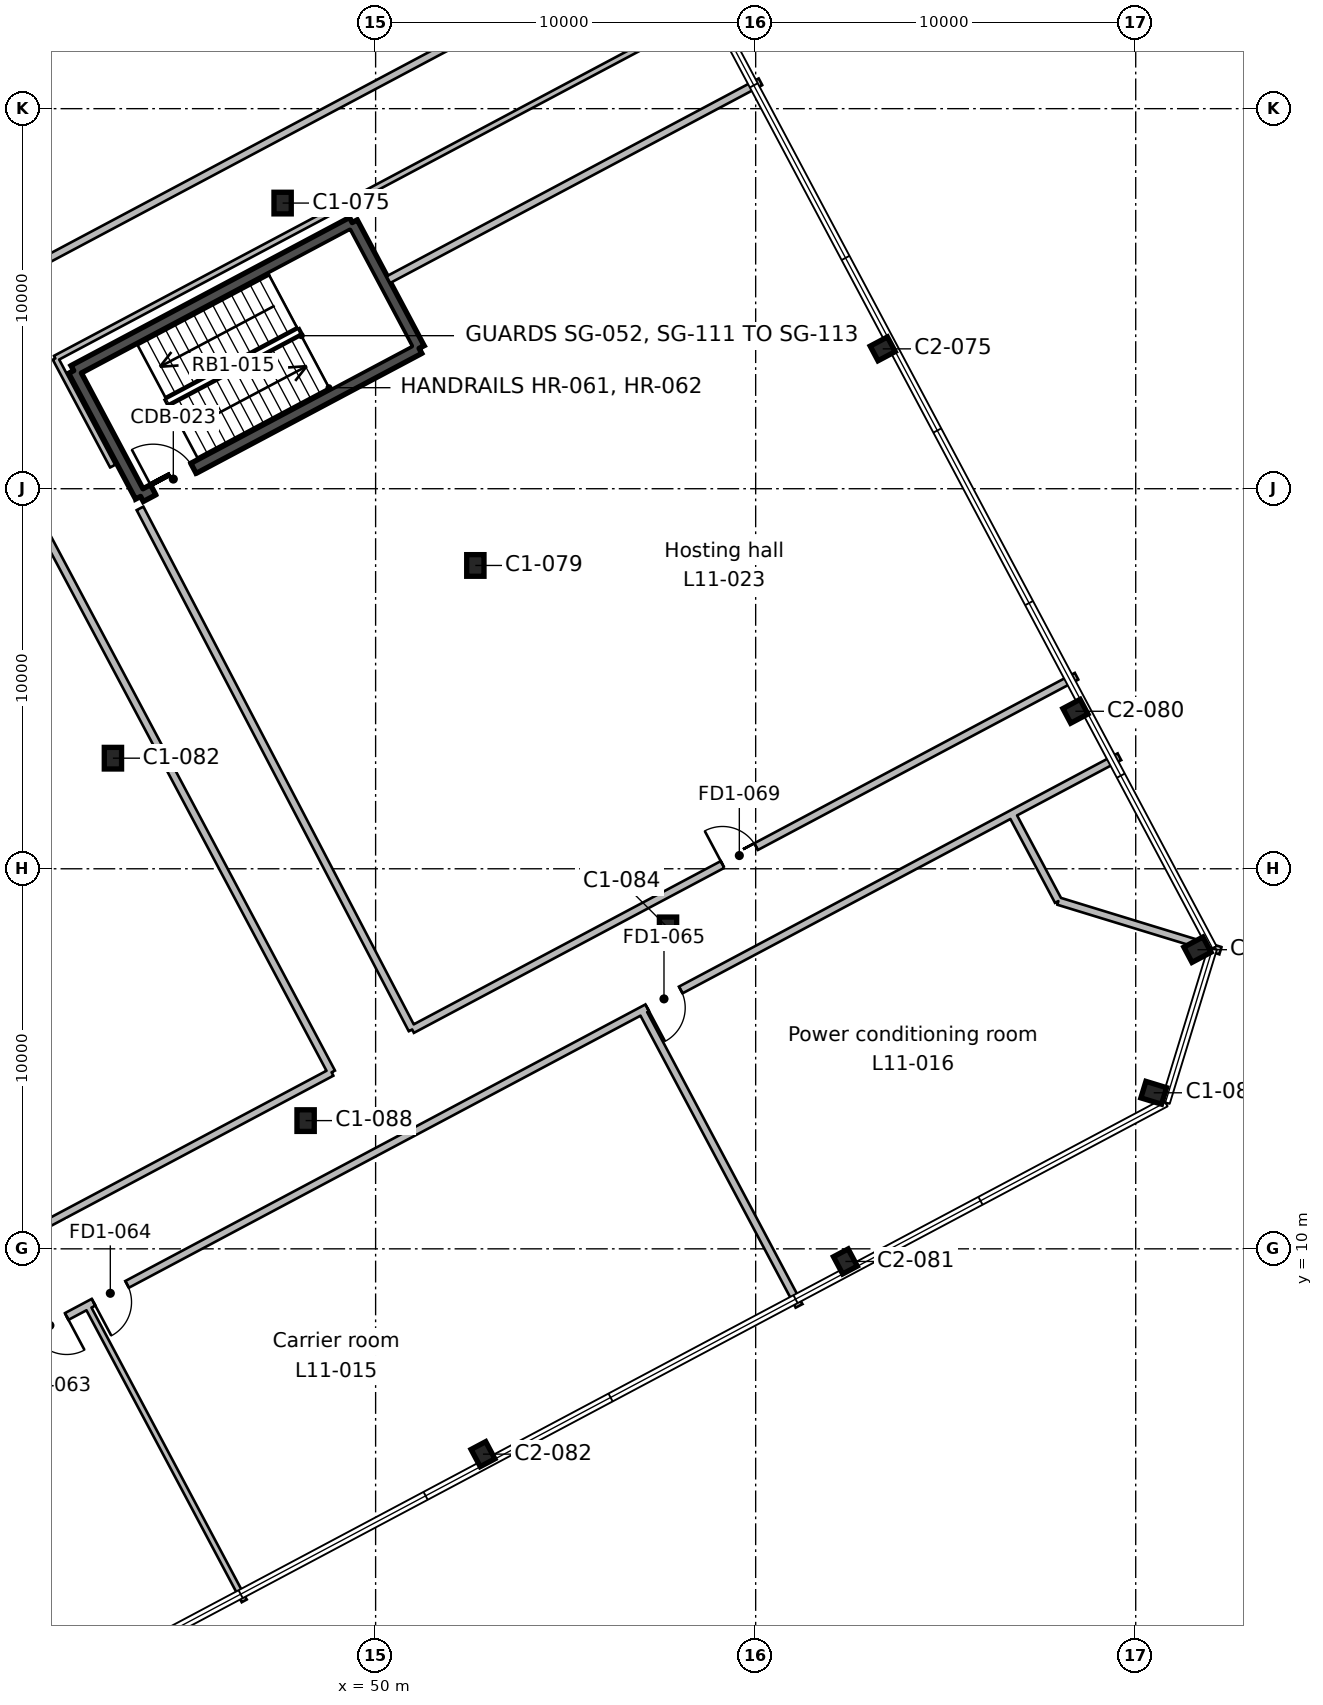
"""IFC4 building model, lengths in metres.
Left out: names, types, materials, properties, quantities, classifications, styles, units other than length and angle.
Written with IfcOpenShell. Run it as: python <this file> out.ifc"""

import sys

from ifc_helpers import new_model, si_unit, direction, frame, frame_2d, origin, origin_2d, place, context, subcontext, project, spatial, rectangle, i_section, extrude, element, fill, save


model = new_model("IFC4")
c1 = context("Model", 3, precision=1e-05, world=origin(), true_north=direction((0.0, 1.0)))
c2 = subcontext(c1, "Body", "Model", "MODEL_VIEW")
j1 = project(units=[si_unit("LENGTHUNIT", "METRE"), si_unit("PLANEANGLEUNIT", "RADIAN")], contexts=[c1])
p1 = place(None, origin())
s1 = spatial("IfcSite", under=j1, at=p1, CompositionType="ELEMENT")
p2 = place(p1, origin())
s2 = spatial("IfcBuilding", under=s1, at=p2, CompositionType="ELEMENT")
p3 = place(p2, frame((0.0, 0.0, 60.8)))
s3 = spatial("IfcBuildingStorey", under=s2, at=p3, CompositionType="ELEMENT", Elevation=60.8)
for number, where, z_axis, x_axis in (
    (1, (52.825, 4.598, 0.0), (0.0, 0.0, 1.0), (0.883, 0.469, 0.0)),
    (2, (62.361, 9.668, 0.0), (0.0, 0.0, 1.0), (0.883, 0.469, 0.0)),
):
    element("IfcColumn", number, at=place(p3, frame(where, z_axis=z_axis, x_axis=x_axis)), inside=s3, PredefinedType="COLUMN", context=c2, shape_type="SweptSolid", body=[
        extrude(i_section(OverallWidth=0.437, OverallDepth=0.513, WebThickness=0.061, FlangeThickness=0.097, FilletRadius=0.015, at=origin_2d()), origin(), (0.0, 0.0, 1.0), 5.4),
    ])
for number, where, z_axis, x_axis in (
    (3, (48.158, 13.374, 0.0), (0.0, 0.0, 1.0), (1.0, 0.0, 0.0)),
    (4, (70.474, 14.106, 0.0), (0.0, 0.0, 1.0), (0.292, 0.956, 0.0)),
    (5, (71.625, 17.871, 0.0), (0.0, 0.0, 1.0), (-0.469, 0.883, 0.0)),
    (6, (57.694, 18.445, 0.0), (0.0, 0.0, 1.0), (1.0, 0.0, 0.0)),
    (7, (43.088, 22.91, 0.0), (0.0, 0.0, 1.0), (1.0, 0.0, 0.0)),
):
    element("IfcColumn", number, at=place(p3, frame(where, z_axis=z_axis, x_axis=x_axis)), inside=s3, PredefinedType="COLUMN", context=c2, shape_type="SweptSolid", body=[
        extrude(i_section(OverallWidth=0.455, OverallDepth=0.569, WebThickness=0.078, FlangeThickness=0.125, FilletRadius=0.015, at=origin_2d()), origin(), (0.0, 0.0, 1.0), 5.4),
    ])
p4 = place(p3, frame((68.413, 24.144, 0.0), z_axis=(0.0, 0.0, 1.0), x_axis=(-0.469471562786, 0.882947592859, 0.0)))
e8 = element("IfcColumn", 8, at=p4, inside=s3, PredefinedType="COLUMN", context=c2, shape_type="SweptSolid", body=[
    extrude(i_section(OverallWidth=0.437, OverallDepth=0.513, WebThickness=0.061, FlangeThickness=0.097, FilletRadius=0.015, at=origin_2d()), origin(), (0.0, 0.0, 1.0), 5.4),
])
p5 = place(p3, frame((52.624, 27.981, 0.0), z_axis=(0.0, 0.0, 1.0), x_axis=(1.0, 0.0, 0.0)))
e9 = element("IfcColumn", 9, at=p5, inside=s3, PredefinedType="COLUMN", context=c2, shape_type="SweptSolid", body=[
    extrude(i_section(OverallWidth=0.455, OverallDepth=0.569, WebThickness=0.078, FlangeThickness=0.125, FilletRadius=0.015, at=origin_2d()), origin(), (0.0, 0.0, 1.0), 5.4),
])
p6 = place(p3, frame((63.343, 33.68, 0.0), z_axis=(0.0, 0.0, 1.0), x_axis=(-0.469471562786, 0.882947592859, 0.0)))
e10 = element("IfcColumn", 10, at=p6, inside=s3, PredefinedType="COLUMN", context=c2, shape_type="SweptSolid", body=[
    extrude(i_section(OverallWidth=0.437, OverallDepth=0.513, WebThickness=0.061, FlangeThickness=0.097, FilletRadius=0.015, at=origin_2d()), origin(), (0.0, 0.0, 1.0), 5.4),
])
p7 = place(p3, frame((47.553, 37.516, 0.0), z_axis=(0.0, 0.0, 1.0), x_axis=(1.0, 0.0, 0.0)))
e11 = element("IfcColumn", 11, at=p7, inside=s3, PredefinedType="COLUMN", context=c2, shape_type="SweptSolid", body=[
    extrude(i_section(OverallWidth=0.455, OverallDepth=0.569, WebThickness=0.078, FlangeThickness=0.125, FilletRadius=0.015, at=origin_2d()), origin(), (0.0, 0.0, 1.0), 5.4),
])
p8 = place(p3, frame((49.384, 37.004, 0.0), z_axis=(0.0, 0.0, 1.0), x_axis=(0.46946936446, -0.882948761726, 0.0)))
e12 = element("IfcWall", 12, at=p8, inside=s3, PredefinedType="SHEAR", context=c2, shape_type="SweptSolid", body=[
    extrude(rectangle(XDim=3.75, YDim=0.3, at=frame_2d((1.875, 0.0))), origin(), (0.0, 0.0, 1.0), 5.4),
])
p9 = place(p3, frame((51.145, 33.693, 0.0), z_axis=(0.0, 0.0, 1.0), x_axis=(-0.882945809314, -0.469474917132, 0.0)))
e13 = element("IfcWall", 13, at=p9, inside=s3, PredefinedType="SHEAR", context=c2, shape_type="SweptSolid", body=[
    extrude(rectangle(XDim=8.3, YDim=0.3, at=frame_2d((4.15, 0.0))), origin(), (0.0, 0.0, 1.0), 5.4),
])
p10 = place(p9, frame((6.725, 0.0, 0.0)))
e14 = element("IfcOpeningElement", 14, at=p10, cuts=e13, PredefinedType="OPENING", context=c2, shape_type="SweptSolid", body=[
    extrude(rectangle(XDim=1.2, YDim=2.1, at=frame_2d((0.6, 1.05))), frame((0.0, 0.16, 0.0), z_axis=(0.0, -1.0, 0.0), x_axis=(1.0, 0.0, 0.0)), (0.0, 0.0, 1.0), 0.32),
])
p11 = place(p3, frame((43.816, 29.796, 0.0), z_axis=(0.0, 0.0, 1.0), x_axis=(-0.46946936446, 0.882948761726, 0.0)))
e15 = element("IfcWall", 15, at=p11, inside=s3, PredefinedType="SHEAR", context=c2, shape_type="SweptSolid", body=[
    extrude(rectangle(XDim=3.75, YDim=0.3, at=frame_2d((1.875, 0.0))), origin(), (0.0, 0.0, 1.0), 5.4),
])
p12 = place(p3, frame((42.055, 33.107, 0.0), z_axis=(0.0, 0.0, 1.0), x_axis=(0.882945809314, 0.469474917132, 0.0)))
e16 = element("IfcWall", 16, at=p12, inside=s3, PredefinedType="SHEAR", context=c2, shape_type="SweptSolid", body=[
    extrude(rectangle(XDim=8.3, YDim=0.3, at=frame_2d((4.15, 0.0))), origin(), (0.0, 0.0, 1.0), 5.4),
])
p13 = place(p3, frame((0.0, 14.044, 0.0), z_axis=(0.0, 0.0, 1.0), x_axis=(0.882943219941, 0.469479786955, 0.0)))
e17 = element("IfcWall", 17, at=p13, inside=s3, PredefinedType="PARTITIONING", context=c2, shape_type="SweptSolid", body=[
    extrude(rectangle(XDim=65.607, YDim=0.2, at=frame_2d((32.803, 0.0))), origin(), (0.0, 0.0, 1.0), 5.0),
])
p14 = place(p13, frame((35.55, 0.0, 0.0)))
e18 = element("IfcOpeningElement", 18, at=p14, cuts=e17, PredefinedType="OPENING", context=c2, shape_type="SweptSolid", body=[
    extrude(rectangle(XDim=1.0, YDim=2.1, at=frame_2d((0.5, 1.05))), frame((0.0, 0.11, 0.0), z_axis=(0.0, -1.0, 0.0), x_axis=(1.0, 0.0, 0.0)), (0.0, 0.0, 1.0), 0.22),
])
p15 = place(p13, frame((32.15, 0.0, 0.0)))
e19 = element("IfcOpeningElement", 19, at=p15, cuts=e17, PredefinedType="OPENING", context=c2, shape_type="SweptSolid", body=[
    extrude(rectangle(XDim=1.0, YDim=2.1, at=frame_2d((0.5, 1.05))), frame((0.0, 0.11, 0.0), z_axis=(0.0, -1.0, 0.0), x_axis=(1.0, 0.0, 0.0)), (0.0, 0.0, 1.0), 0.22),
])
p16 = place(p13, frame((29.75, 0.0, 0.0)))
e20 = element("IfcOpeningElement", 20, at=p16, cuts=e17, PredefinedType="OPENING", context=c2, shape_type="SweptSolid", body=[
    extrude(rectangle(XDim=1.0, YDim=2.1, at=frame_2d((0.5, 1.05))), frame((0.0, 0.11, 0.0), z_axis=(0.0, -1.0, 0.0), x_axis=(1.0, 0.0, 0.0)), (0.0, 0.0, 1.0), 0.22),
])
p17 = place(p13, frame((13.95, 0.0, 0.0)))
e21 = element("IfcOpeningElement", 21, at=p17, cuts=e17, PredefinedType="OPENING", context=c2, shape_type="SweptSolid", body=[
    extrude(rectangle(XDim=1.0, YDim=2.1, at=frame_2d((0.5, 1.05))), frame((0.0, 0.11, 0.0), z_axis=(0.0, -1.0, 0.0), x_axis=(1.0, 0.0, 0.0)), (0.0, 0.0, 1.0), 0.22),
])
p18 = place(p3, frame((69.57, 22.948, 0.0), z_axis=(0.0, 0.0, 1.0), x_axis=(-0.882939582192, -0.469486628349, 0.0)))
e22 = element("IfcWall", 22, at=p18, inside=s3, PredefinedType="PARTITIONING", context=c2, shape_type="SweptSolid", body=[
    extrude(rectangle(XDim=63.39, YDim=0.2, at=frame_2d((31.695, 0.0))), origin(), (0.0, 0.0, 1.0), 5.0),
])
p19 = place(p18, frame((41.971, 0.0, 0.0)))
e23 = element("IfcOpeningElement", 23, at=p19, cuts=e22, PredefinedType="OPENING", context=c2, shape_type="SweptSolid", body=[
    extrude(rectangle(XDim=1.0, YDim=2.1, at=frame_2d((0.5, 1.05))), frame((0.0, 0.11, 0.0), z_axis=(0.0, -1.0, 0.0), x_axis=(1.0, 0.0, 0.0)), (0.0, 0.0, 1.0), 0.22),
])
p20 = place(p18, frame((31.371, 0.0, 0.0)))
e24 = element("IfcOpeningElement", 24, at=p20, cuts=e22, PredefinedType="OPENING", context=c2, shape_type="SweptSolid", body=[
    extrude(rectangle(XDim=1.0, YDim=2.1, at=frame_2d((0.5, 1.05))), frame((0.0, 0.11, 0.0), z_axis=(0.0, -1.0, 0.0), x_axis=(1.0, 0.0, 0.0)), (0.0, 0.0, 1.0), 0.22),
])
p21 = place(p18, frame((29.571, 0.0, 0.0)))
e25 = element("IfcOpeningElement", 25, at=p21, cuts=e22, PredefinedType="OPENING", context=c2, shape_type="SweptSolid", body=[
    extrude(rectangle(XDim=1.0, YDim=2.1, at=frame_2d((0.5, 1.05))), frame((0.0, 0.11, 0.0), z_axis=(0.0, -1.0, 0.0), x_axis=(1.0, 0.0, 0.0)), (0.0, 0.0, 1.0), 0.22),
])
p22 = place(p18, frame((13.071, 0.0, 0.0)))
e26 = element("IfcOpeningElement", 26, at=p22, cuts=e22, PredefinedType="OPENING", context=c2, shape_type="SweptSolid", body=[
    extrude(rectangle(XDim=1.0, YDim=2.1, at=frame_2d((0.5, 1.05))), frame((0.0, 0.11, 0.0), z_axis=(0.0, -1.0, 0.0), x_axis=(1.0, 0.0, 0.0)), (0.0, 0.0, 1.0), 0.22),
])
p23 = place(p3, frame((42.411, 8.506, 0.0), z_axis=(0.0, 0.0, 1.0), x_axis=(0.469578463112, -0.882890744646, 0.0)))
e27 = element("IfcWall", 27, at=p23, inside=s3, PredefinedType="PARTITIONING", context=c2, shape_type="SweptSolid", body=[
    extrude(rectangle(XDim=8.8, YDim=0.15, at=frame_2d((4.4, 0.0))), origin(), (0.0, 0.0, 1.0), 5.0),
])
p24 = place(p3, frame((38.546, 40.882, 0.0), z_axis=(0.0, 0.0, 1.0), x_axis=(0.88296536188, 0.469438142592, 0.0)))
e28 = element("IfcWall", 28, at=p24, inside=s3, PredefinedType="PARTITIONING", context=c2, shape_type="SweptSolid", body=[
    extrude(rectangle(XDim=10.515, YDim=0.2, at=frame_2d((5.257, 0.0))), origin(), (0.0, 0.0, 1.0), 5.0),
])
p25 = place(p3, frame((59.054, 42.725, 0.0), z_axis=(0.0, 0.0, 1.0), x_axis=(-0.882950585831, -0.469465933781, 0.0)))
e29 = element("IfcWall", 29, at=p25, inside=s3, PredefinedType="PARTITIONING", context=c2, shape_type="SweptSolid", body=[
    extrude(rectangle(XDim=19.8, YDim=0.15, at=frame_2d((9.9, 0.0))), origin(), (0.0, 0.0, 1.0), 5.0),
])
p26 = place(p3, frame((41.572, 33.43, 0.0), z_axis=(0.0, 0.0, 1.0), x_axis=(0.469510863882, -0.882926694974, 0.0)))
e30 = element("IfcWall", 30, at=p26, inside=s3, PredefinedType="PARTITIONING", context=c2, shape_type="SweptSolid", body=[
    extrude(rectangle(XDim=3.212, YDim=0.15, at=frame_2d((1.606, 0.0))), origin(), (0.0, 0.0, 1.0), 5.0),
])
p27 = place(p3, frame((43.801, 29.483, 0.0), z_axis=(0.0, 0.0, 1.0), x_axis=(0.462864260364, -0.886429171721, 0.0)))
e31 = element("IfcWall", 31, at=p27, inside=s3, PredefinedType="PARTITIONING", context=c2, shape_type="SweptSolid", body=[
    extrude(rectangle(XDim=15.469, YDim=0.2, at=frame_2d((7.734, 0.0))), origin(), (0.0, 0.0, 1.0), 5.0),
])
p28 = place(p3, frame((50.961, 15.771, 0.0), z_axis=(0.0, 0.0, 1.0), x_axis=(0.882969283776, 0.469430765831, 0.0)))
e32 = element("IfcWall", 32, at=p28, inside=s3, PredefinedType="PARTITIONING", context=c2, shape_type="SweptSolid", body=[
    extrude(rectangle(XDim=19.8, YDim=0.2, at=frame_2d((9.9, 0.0))), origin(), (0.0, 0.0, 1.0), 5.0),
])
p29 = place(p28, frame((9.25, 0.0, 0.0)))
e33 = element("IfcOpeningElement", 33, at=p29, cuts=e32, PredefinedType="OPENING", context=c2, shape_type="SweptSolid", body=[
    extrude(rectangle(XDim=1.0, YDim=2.1, at=frame_2d((0.5, 1.05))), frame((0.0, 0.11, 0.0), z_axis=(0.0, -1.0, 0.0), x_axis=(1.0, 0.0, 0.0)), (0.0, 0.0, 1.0), 0.22),
])
p30 = place(p3, frame((57.011, 16.269, 0.0), z_axis=(0.0, 0.0, 1.0), x_axis=(0.469445946219, -0.882961212952, 0.0)))
e34 = element("IfcWall", 34, at=p30, inside=s3, PredefinedType="PARTITIONING", context=c2, shape_type="SweptSolid", body=[
    extrude(rectangle(XDim=8.8, YDim=0.2, at=frame_2d((4.4, 0.0))), origin(), (0.0, 0.0, 1.0), 5.0),
])
p31 = place(p3, frame((50.336, 35.501, 0.0), z_axis=(0.0, 0.0, 1.0), x_axis=(0.88295860562, 0.469450850209, 0.0)))
e35 = element("IfcWall", 35, at=p31, inside=s3, PredefinedType="PARTITIONING", context=c2, shape_type="SweptSolid", body=[
    extrude(rectangle(XDim=11.089, YDim=0.2, at=frame_2d((5.544, 0.0))), origin(), (0.0, 0.0, 1.0), 5.0),
])
p32 = place(p3, frame((66.744, 21.445, 0.0), z_axis=(0.0, 0.0, 1.0), x_axis=(0.469720428517, -0.882815223608, 0.0)))
e36 = element("IfcWall", 36, at=p32, inside=s3, PredefinedType="PARTITIONING", context=c2, shape_type="SweptSolid", body=[
    extrude(rectangle(XDim=2.6, YDim=0.2, at=frame_2d((1.3, 0.0))), origin(), (0.0, 0.0, 1.0), 5.0),
])
p33 = place(p3, frame((67.965, 19.15, 0.0), z_axis=(0.0, 0.0, 1.0), x_axis=(0.956221844793, -0.292642757539, 0.0)))
e37 = element("IfcWall", 37, at=p33, inside=s3, PredefinedType="PARTITIONING", context=c2, shape_type="SweptSolid", body=[
    extrude(rectangle(XDim=4.459, YDim=0.2, at=frame_2d((2.229, 0.0))), origin(), (0.0, 0.0, 1.0), 5.0),
])
p34 = place(p3, frame((39.453, 32.303, 0.0), z_axis=(0.0, 0.0, 1.0), x_axis=(0.469461333319, -0.882953031887, 0.0)))
e38 = element("IfcWall", 38, at=p34, inside=s3, PredefinedType="PARTITIONING", context=c2, shape_type="SweptSolid", body=[
    extrude(rectangle(XDim=20.0, YDim=0.2, at=frame_2d((10.0, 0.0))), origin(), (0.0, 0.0, 1.0), 5.0),
])
p35 = place(p3, frame((48.842, 14.644, 0.0), z_axis=(0.0, 0.0, 1.0), x_axis=(-0.882924718888, -0.46951457994, 0.0)))
e39 = element("IfcWall", 39, at=p35, inside=s3, PredefinedType="PARTITIONING", context=c2, shape_type="SweptSolid", body=[
    extrude(rectangle(XDim=10.0, YDim=0.2, at=frame_2d((5.0, 0.0))), origin(), (0.0, 0.0, 1.0), 5.0),
])
p36 = place(p10, frame((1.2, 0.0, 0.0), z_axis=(0.0, 0.0, 1.0), x_axis=(-1.0, 0.0, 0.0)))
e40 = element("IfcDoor", 40, at=p36, inside=s3, OperationType="SINGLE_SWING_LEFT", PredefinedType="DOOR", context=c2, shape_type="SweptSolid", body=[
    extrude(rectangle(XDim=1.2, YDim=2.1, at=frame_2d((0.6, 1.05))), frame((0.0, 0.025, 0.0), z_axis=(0.0, -1.0, 0.0), x_axis=(1.0, 0.0, 0.0)), (0.0, 0.0, 1.0), 0.05),
])
fill(e14, e40)
p37 = place(p20, origin())
e41 = element("IfcDoor", 41, at=p37, inside=s3, OperationType="SINGLE_SWING_LEFT", PredefinedType="DOOR", context=c2, shape_type="SweptSolid", body=[
    extrude(rectangle(XDim=1.0, YDim=2.1, at=frame_2d((0.5, 1.05))), frame((0.0, 0.025, 0.0), z_axis=(0.0, -1.0, 0.0), x_axis=(1.0, 0.0, 0.0)), (0.0, 0.0, 1.0), 0.05),
])
fill(e24, e41)
p38 = place(p21, origin())
e42 = element("IfcDoor", 42, at=p38, inside=s3, OperationType="SINGLE_SWING_RIGHT", PredefinedType="DOOR", context=c2, shape_type="SweptSolid", body=[
    extrude(rectangle(XDim=1.0, YDim=2.1, at=frame_2d((0.5, 1.05))), frame((0.0, 0.025, 0.0), z_axis=(0.0, -1.0, 0.0), x_axis=(1.0, 0.0, 0.0)), (0.0, 0.0, 1.0), 0.05),
])
fill(e25, e42)
p39 = place(p22, origin())
e43 = element("IfcDoor", 43, at=p39, inside=s3, OperationType="SINGLE_SWING_RIGHT", PredefinedType="DOOR", context=c2, shape_type="SweptSolid", body=[
    extrude(rectangle(XDim=1.0, YDim=2.1, at=frame_2d((0.5, 1.05))), frame((0.0, 0.025, 0.0), z_axis=(0.0, -1.0, 0.0), x_axis=(1.0, 0.0, 0.0)), (0.0, 0.0, 1.0), 0.05),
])
fill(e26, e43)
p40 = place(p29, origin())
e44 = element("IfcDoor", 44, at=p40, inside=s3, OperationType="SINGLE_SWING_LEFT", PredefinedType="DOOR", context=c2, shape_type="SweptSolid", body=[
    extrude(rectangle(XDim=1.0, YDim=2.1, at=frame_2d((0.5, 1.05))), frame((0.0, 0.025, 0.0), z_axis=(0.0, -1.0, 0.0), x_axis=(1.0, 0.0, 0.0)), (0.0, 0.0, 1.0), 0.05),
])
fill(e33, e44)
save(model, sys.argv[1])
